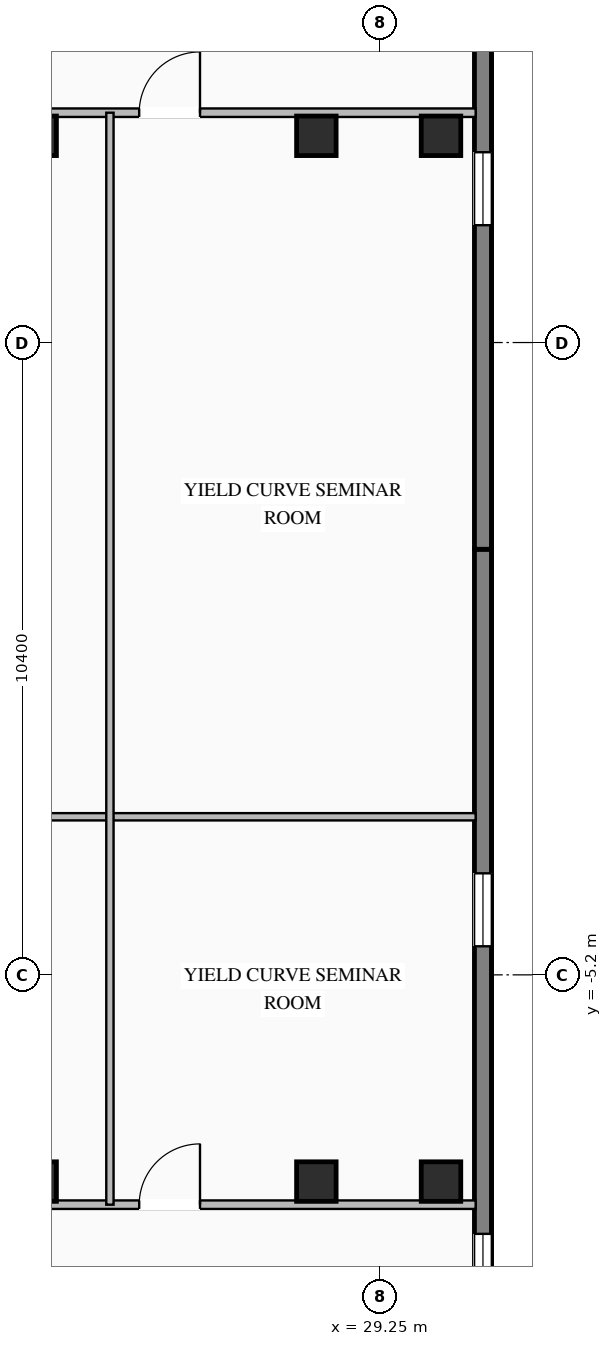
"""IFC4 building model, lengths in metres.
Left out: names, types, materials, properties, quantities, classifications, styles, units other than length and angle.
Written with IfcOpenShell. Run it as: python <this file> out.ifc"""

import sys

from ifc_helpers import new_model, si_unit, direction, frame, frame_2d, origin, origin_2d, place, context, subcontext, project, spatial, rectangle, i_section, extrude, element, fill, save


model = new_model("IFC4")
c1 = context("Model", 3, precision=1e-05, world=origin(), true_north=direction((0.0, 1.0)))
c2 = subcontext(c1, "Body", "Model", "MODEL_VIEW")
j1 = project(units=[si_unit("LENGTHUNIT", "METRE"), si_unit("PLANEANGLEUNIT", "RADIAN")], contexts=[c1])
p1 = place(None, origin())
s1 = spatial("IfcSite", under=j1, at=p1, CompositionType="ELEMENT")
p2 = place(p1, origin())
s2 = spatial("IfcBuilding", under=s1, at=p2, CompositionType="ELEMENT")
p3 = place(p2, frame((0.0, 0.0, 148.45)))
s3 = spatial("IfcBuildingStorey", under=s2, at=p3, CompositionType="ELEMENT", Elevation=148.45)
for number, where, z_axis, x_axis in (
    (1, (23.6, -8.6, 0.0), (0.0, 0.0, 1.0), (1.0, 0.0, 0.0)),
    (2, (23.6, 8.6, 0.0), (0.0, 0.0, 1.0), (1.0, 0.0, 0.0)),
    (3, (28.2, -8.6, 0.0), (0.0, 0.0, 1.0), (1.0, 0.0, 0.0)),
    (4, (28.2, 8.6, 0.0), (0.0, 0.0, 1.0), (1.0, 0.0, 0.0)),
    (5, (30.25, -8.6, 0.0), (0.0, 0.0, 1.0), (1.0, 0.0, 0.0)),
    (6, (30.25, 8.6, 0.0), (0.0, 0.0, 1.0), (1.0, 0.0, 0.0)),
):
    element("IfcColumn", number, at=place(p3, frame(where, z_axis=z_axis, x_axis=x_axis)), inside=s3, PredefinedType="COLUMN", context=c2, shape_type="SweptSolid", body=[
        extrude(i_section(OverallWidth=0.65, OverallDepth=0.65, WebThickness=0.028, FlangeThickness=0.04, at=origin_2d()), origin(), (0.0, 0.0, 1.0), 3.45),
    ])
p4 = place(p3, frame((30.94, 1.8, 0.0), z_axis=(0.0, 0.0, 1.0), x_axis=(0.0, -1.0, 0.0)))
e7 = element("IfcWall", 7, at=p4, inside=s3, PredefinedType="STANDARD", context=c2, shape_type="SweptSolid", body=[
    extrude(rectangle(XDim=17.79, YDim=0.28, at=frame_2d((8.895, 0.0))), origin(), (0.0, 0.0, 1.0), 3.25),
])
p5 = place(p4, frame((5.33, 0.0, 0.76)))
e8 = element("IfcOpeningElement", 8, at=p5, cuts=e7, PredefinedType="OPENING", context=c2, shape_type="SweptSolid", body=[
    extrude(rectangle(XDim=1.2, YDim=1.95, at=frame_2d((0.6, 0.975))), frame((0.0, 0.15, 0.0), z_axis=(0.0, -1.0, 0.0), x_axis=(1.0, 0.0, 0.0)), (0.0, 0.0, 1.0), 0.3),
])
p6 = place(p4, frame((11.26, 0.0, 0.76)))
e9 = element("IfcOpeningElement", 9, at=p6, cuts=e7, PredefinedType="OPENING", context=c2, shape_type="SweptSolid", body=[
    extrude(rectangle(XDim=1.2, YDim=1.95, at=frame_2d((0.6, 0.975))), frame((0.0, 0.15, 0.0), z_axis=(0.0, -1.0, 0.0), x_axis=(1.0, 0.0, 0.0)), (0.0, 0.0, 1.0), 0.3),
])
p7 = place(p3, frame((30.94, 19.59, 0.0), z_axis=(0.0, 0.0, 1.0), x_axis=(0.0, -1.0, 0.0)))
e10 = element("IfcWall", 10, at=p7, inside=s3, PredefinedType="STANDARD", context=c2, shape_type="SweptSolid", body=[
    extrude(rectangle(XDim=17.79, YDim=0.28, at=frame_2d((8.895, 0.0))), origin(), (0.0, 0.0, 1.0), 3.25),
])
p8 = place(p7, frame((5.33, 0.0, 0.76)))
e11 = element("IfcOpeningElement", 11, at=p8, cuts=e10, PredefinedType="OPENING", context=c2, shape_type="SweptSolid", body=[
    extrude(rectangle(XDim=1.2, YDim=1.95, at=frame_2d((0.6, 0.975))), frame((0.0, 0.15, 0.0), z_axis=(0.0, -1.0, 0.0), x_axis=(1.0, 0.0, 0.0)), (0.0, 0.0, 1.0), 0.3),
])
p9 = place(p7, frame((11.26, 0.0, 0.76)))
e12 = element("IfcOpeningElement", 12, at=p9, cuts=e10, PredefinedType="OPENING", context=c2, shape_type="SweptSolid", body=[
    extrude(rectangle(XDim=1.2, YDim=1.95, at=frame_2d((0.6, 0.975))), frame((0.0, 0.15, 0.0), z_axis=(0.0, -1.0, 0.0), x_axis=(1.0, 0.0, 0.0)), (0.0, 0.0, 1.0), 0.3),
])
p10 = place(p3, frame((19.05, 8.98, 0.0), z_axis=(0.0, 0.0, 1.0), x_axis=(1.0, 0.0, 0.0)))
e13 = element("IfcWall", 13, at=p10, inside=s3, PredefinedType="STANDARD", context=c2, shape_type="SweptSolid", body=[
    extrude(rectangle(XDim=11.77, YDim=0.14, at=frame_2d((5.885, 0.0))), origin(), (0.0, 0.0, 1.0), 3.25),
])
p11 = place(p10, frame((2.508, 0.0, 0.0)))
e14 = element("IfcOpeningElement", 14, at=p11, cuts=e13, PredefinedType="OPENING", context=c2, shape_type="SweptSolid", body=[
    extrude(rectangle(XDim=1.0, YDim=2.08, at=frame_2d((0.5, 1.04))), frame((0.0, 0.08, 0.0), z_axis=(0.0, -1.0, 0.0), x_axis=(1.0, 0.0, 0.0)), (0.0, 0.0, 1.0), 0.16),
])
p12 = place(p10, frame((6.236, 0.0, 0.0)))
e15 = element("IfcOpeningElement", 15, at=p12, cuts=e13, PredefinedType="OPENING", context=c2, shape_type="SweptSolid", body=[
    extrude(rectangle(XDim=1.0, YDim=2.08, at=frame_2d((0.5, 1.04))), frame((0.0, 0.08, 0.0), z_axis=(0.0, -1.0, 0.0), x_axis=(1.0, 0.0, 0.0)), (0.0, 0.0, 1.0), 0.16),
])
p13 = place(p3, frame((19.05, -8.98, 0.0), z_axis=(0.0, 0.0, 1.0), x_axis=(1.0, 0.0, 0.0)))
e16 = element("IfcWall", 16, at=p13, inside=s3, PredefinedType="STANDARD", context=c2, shape_type="SweptSolid", body=[
    extrude(rectangle(XDim=11.77, YDim=0.14, at=frame_2d((5.885, 0.0))), origin(), (0.0, 0.0, 1.0), 3.25),
])
p14 = place(p13, frame((2.508, 0.0, 0.0)))
e17 = element("IfcOpeningElement", 17, at=p14, cuts=e16, PredefinedType="OPENING", context=c2, shape_type="SweptSolid", body=[
    extrude(rectangle(XDim=1.0, YDim=2.08, at=frame_2d((0.5, 1.04))), frame((0.0, 0.08, 0.0), z_axis=(0.0, -1.0, 0.0), x_axis=(1.0, 0.0, 0.0)), (0.0, 0.0, 1.0), 0.16),
])
p15 = place(p13, frame((6.236, 0.0, 0.0)))
e18 = element("IfcOpeningElement", 18, at=p15, cuts=e16, PredefinedType="OPENING", context=c2, shape_type="SweptSolid", body=[
    extrude(rectangle(XDim=1.0, YDim=2.08, at=frame_2d((0.5, 1.04))), frame((0.0, 0.08, 0.0), z_axis=(0.0, -1.0, 0.0), x_axis=(1.0, 0.0, 0.0)), (0.0, 0.0, 1.0), 0.16),
])
p16 = place(p3, frame((19.05, -2.6, 0.0), z_axis=(0.0, 0.0, 1.0), x_axis=(1.0, 0.0, 0.0)))
e19 = element("IfcWall", 19, at=p16, inside=s3, PredefinedType="STANDARD", context=c2, shape_type="SweptSolid", body=[
    extrude(rectangle(XDim=11.77, YDim=0.12, at=frame_2d((5.885, 0.0))), origin(), (0.0, 0.0, 1.0), 3.25),
])
p17 = place(p3, frame((24.805, -8.98, 0.0), z_axis=(0.0, 0.0, 1.0), x_axis=(0.0, 1.0, 0.0)))
e20 = element("IfcWall", 20, at=p17, inside=s3, PredefinedType="STANDARD", context=c2, shape_type="SweptSolid", body=[
    extrude(rectangle(XDim=17.96, YDim=0.12, at=frame_2d((8.98, 0.0))), origin(), (0.0, 0.0, 1.0), 3.25),
])
p18 = place(p5, origin())
e21 = element("IfcWindow", 21, at=p18, inside=s3, PartitioningType="SINGLE_PANEL", PredefinedType="WINDOW", context=c2, shape_type="SweptSolid", body=[
    extrude(rectangle(XDim=1.2, YDim=1.95, at=frame_2d((0.6, 0.975))), frame((0.0, 0.03, 0.0), z_axis=(0.0, -1.0, 0.0), x_axis=(1.0, 0.0, 0.0)), (0.0, 0.0, 1.0), 0.06),
])
fill(e8, e21)
p19 = place(p6, origin())
e22 = element("IfcWindow", 22, at=p19, inside=s3, PartitioningType="SINGLE_PANEL", PredefinedType="WINDOW", context=c2, shape_type="SweptSolid", body=[
    extrude(rectangle(XDim=1.2, YDim=1.95, at=frame_2d((0.6, 0.975))), frame((0.0, 0.03, 0.0), z_axis=(0.0, -1.0, 0.0), x_axis=(1.0, 0.0, 0.0)), (0.0, 0.0, 1.0), 0.06),
])
fill(e9, e22)
p20 = place(p9, origin())
e23 = element("IfcWindow", 23, at=p20, inside=s3, PartitioningType="SINGLE_PANEL", PredefinedType="WINDOW", context=c2, shape_type="SweptSolid", body=[
    extrude(rectangle(XDim=1.2, YDim=1.95, at=frame_2d((0.6, 0.975))), frame((0.0, 0.03, 0.0), z_axis=(0.0, -1.0, 0.0), x_axis=(1.0, 0.0, 0.0)), (0.0, 0.0, 1.0), 0.06),
])
fill(e12, e23)
p21 = place(p12, origin())
e24 = element("IfcDoor", 24, at=p21, inside=s3, OperationType="SINGLE_SWING_RIGHT", PredefinedType="DOOR", context=c2, shape_type="SweptSolid", body=[
    extrude(rectangle(XDim=1.0, YDim=2.08, at=frame_2d((0.5, 1.04))), frame((0.0, 0.025, 0.0), z_axis=(0.0, -1.0, 0.0), x_axis=(1.0, 0.0, 0.0)), (0.0, 0.0, 1.0), 0.05),
])
fill(e15, e24)
p22 = place(p15, origin())
e25 = element("IfcDoor", 25, at=p22, inside=s3, OperationType="SINGLE_SWING_RIGHT", PredefinedType="DOOR", context=c2, shape_type="SweptSolid", body=[
    extrude(rectangle(XDim=1.0, YDim=2.08, at=frame_2d((0.5, 1.04))), frame((0.0, 0.025, 0.0), z_axis=(0.0, -1.0, 0.0), x_axis=(1.0, 0.0, 0.0)), (0.0, 0.0, 1.0), 0.05),
])
fill(e18, e25)
save(model, sys.argv[1])
